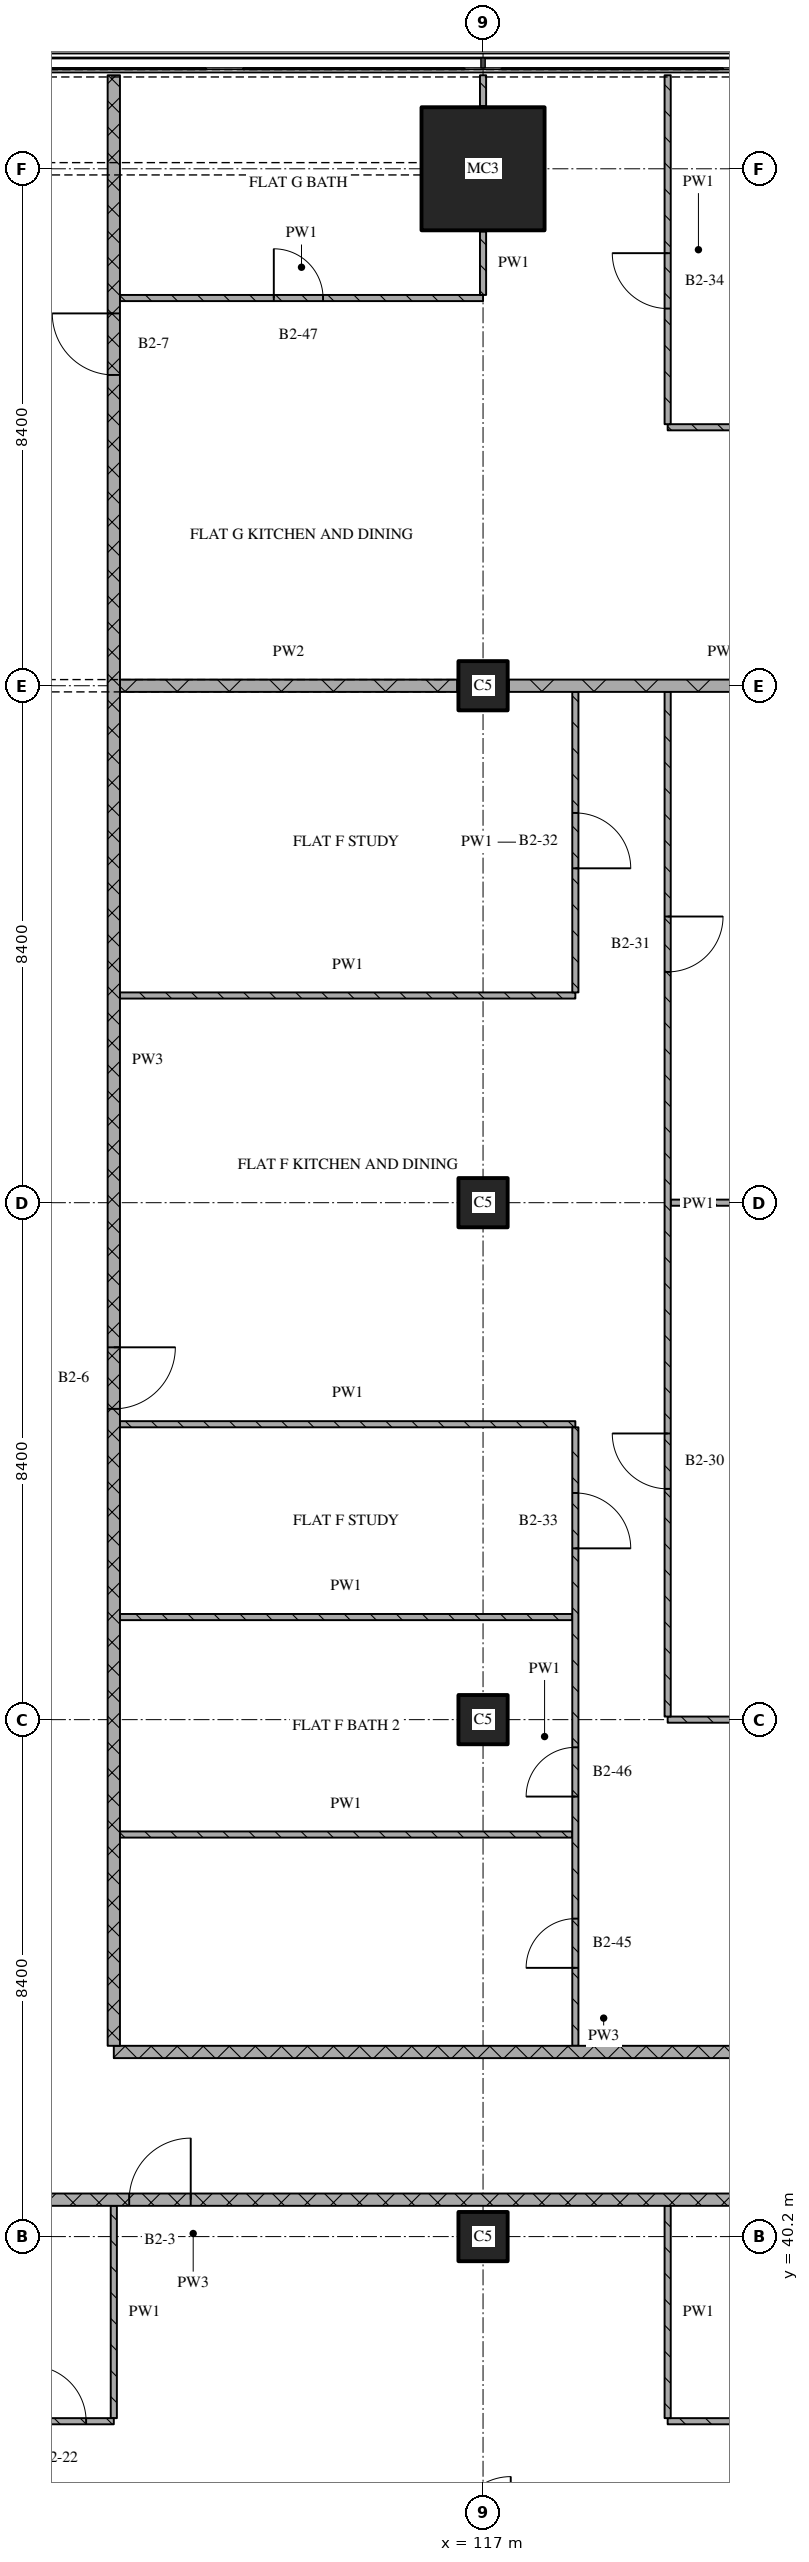
"""IFC4 building model, lengths in metres.
Left out: names, types, materials, properties, quantities, classifications, styles, units other than length and angle.
Written with IfcOpenShell. Run it as: python <this file> out.ifc"""

import sys

from ifc_helpers import new_model, si_unit, direction, frame, frame_2d, origin, origin_2d, place, context, subcontext, project, spatial, rectangle, extrude, element, fill, save


model = new_model("IFC4")
c1 = context("Model", 3, precision=1e-05, world=origin(), true_north=direction((0.0, 1.0)))
c2 = subcontext(c1, "Body", "Model", "MODEL_VIEW")
j1 = project(units=[si_unit("LENGTHUNIT", "METRE"), si_unit("PLANEANGLEUNIT", "RADIAN")], contexts=[c1])
p1 = place(None, origin())
s1 = spatial("IfcSite", under=j1, at=p1, CompositionType="ELEMENT")
p2 = place(p1, origin())
s2 = spatial("IfcBuilding", under=s1, at=p2, CompositionType="ELEMENT")
p3 = place(p2, frame((0.0, 0.0, 109.65)))
s3 = spatial("IfcBuildingStorey", under=s2, at=p3, CompositionType="ELEMENT", Elevation=109.65)
for number, where, z_axis, x_axis in (
    (1, (117.0, 40.2, 0.0), (0.0, 0.0, 1.0), (1.0, 0.0, 0.0)),
    (2, (117.0, 48.6, 0.0), (0.0, 0.0, 1.0), (1.0, 0.0, 0.0)),
    (3, (117.0, 57.0, 0.0), (0.0, 0.0, 1.0), (1.0, 0.0, 0.0)),
    (4, (117.0, 65.4, 0.0), (0.0, 0.0, 1.0), (1.0, 0.0, 0.0)),
):
    element("IfcColumn", number, at=place(p3, frame(where, z_axis=z_axis, x_axis=x_axis)), inside=s3, PredefinedType="COLUMN", context=c2, shape_type="SweptSolid", body=[
        extrude(rectangle(XDim=0.8, YDim=0.8, at=origin_2d()), origin(), (0.0, 0.0, 1.0), 3.6),
    ])
p4 = place(p3, frame((117.0, 73.8, 0.0), z_axis=(0.0, 0.0, 1.0), x_axis=(1.0, 0.0, 0.0)))
e5 = element("IfcColumn", 5, at=p4, inside=s3, PredefinedType="COLUMN", context=c2, shape_type="SweptSolid", body=[
    extrude(rectangle(XDim=2.0, YDim=2.0, at=origin_2d()), origin(), (0.0, 0.0, 1.0), 3.6),
])
p5 = place(p3, frame((120.0, 37.2, 0.0), z_axis=(0.0, 0.0, 1.0), x_axis=(1.0, 0.0, 0.0)))
e6 = element("IfcWall", 6, at=p5, inside=s3, PredefinedType="PARTITIONING", context=c2, shape_type="SweptSolid", body=[
    extrude(rectangle(XDim=6.92, YDim=0.1, at=frame_2d((3.46, 0.0))), origin(), (0.0, 0.0, 1.0), 3.32),
])
p6 = place(p5, frame((3.15, 0.0, 0.0)))
e7 = element("IfcOpeningElement", 7, at=p6, cuts=e6, PredefinedType="OPENING", context=c2, shape_type="SweptSolid", body=[
    extrude(rectangle(XDim=0.9, YDim=2.1, at=frame_2d((0.45, 1.05))), frame((0.0, 0.06, 0.0), z_axis=(0.0, -1.0, 0.0), x_axis=(1.0, 0.0, 0.0)), (0.0, 0.0, 1.0), 0.12),
])
p7 = place(p3, frame((124.38, 40.8, 0.0), z_axis=(0.0, 0.0, 1.0), x_axis=(-1.0, 0.0, 0.0)))
e8 = element("IfcWall", 8, at=p7, inside=s3, PredefinedType="PARTITIONING", context=c2, shape_type="SweptSolid", body=[
    extrude(rectangle(XDim=24.18, YDim=0.2, at=frame_2d((12.09, 0.0))), origin(), (0.0, 0.0, 1.0), 3.32),
])
p8 = place(p7, frame((12.13, 0.0, 0.0)))
e9 = element("IfcOpeningElement", 9, at=p8, cuts=e8, PredefinedType="OPENING", context=c2, shape_type="SweptSolid", body=[
    extrude(rectangle(XDim=1.0, YDim=2.1, at=frame_2d((0.5, 1.05))), frame((0.0, 0.11, 0.0), z_axis=(0.0, -1.0, 0.0), x_axis=(1.0, 0.0, 0.0)), (0.0, 0.0, 1.0), 0.22),
])
p9 = place(p3, frame((111.0, 43.2, 0.0), z_axis=(0.0, 0.0, 1.0), x_axis=(1.0, 0.0, 0.0)))
e10 = element("IfcWall", 10, at=p9, inside=s3, PredefinedType="PARTITIONING", context=c2, shape_type="SweptSolid", body=[
    extrude(rectangle(XDim=15.92, YDim=0.2, at=frame_2d((7.96, 0.0))), origin(), (0.0, 0.0, 1.0), 3.32),
])
p10 = place(p3, frame((111.1, 46.733, 0.0), z_axis=(0.0, 0.0, 1.0), x_axis=(1.0, 0.0, 0.0)))
e11 = element("IfcWall", 11, at=p10, inside=s3, PredefinedType="PARTITIONING", context=c2, shape_type="SweptSolid", body=[
    extrude(rectangle(XDim=7.35, YDim=0.1, at=frame_2d((3.675, 0.0))), origin(), (0.0, 0.0, 1.0), 3.32),
])
p11 = place(p3, frame((120.0, 48.6, 0.0), z_axis=(0.0, 0.0, 1.0), x_axis=(1.0, 0.0, 0.0)))
e12 = element("IfcWall", 12, at=p11, inside=s3, PredefinedType="PARTITIONING", context=c2, shape_type="SweptSolid", body=[
    extrude(rectangle(XDim=4.98, YDim=0.1, at=frame_2d((2.49, 0.0))), origin(), (0.0, 0.0, 1.0), 3.32),
])
p12 = place(p3, frame((111.1, 50.267, 0.0), z_axis=(0.0, 0.0, 1.0), x_axis=(1.0, 0.0, 0.0)))
e13 = element("IfcWall", 13, at=p12, inside=s3, PredefinedType="PARTITIONING", context=c2, shape_type="SweptSolid", body=[
    extrude(rectangle(XDim=7.35, YDim=0.1, at=frame_2d((3.675, 0.0))), origin(), (0.0, 0.0, 1.0), 3.32),
])
p13 = place(p3, frame((111.1, 53.4, 0.0), z_axis=(0.0, 0.0, 1.0), x_axis=(1.0, 0.0, 0.0)))
e14 = element("IfcWall", 14, at=p13, inside=s3, PredefinedType="PARTITIONING", context=c2, shape_type="SweptSolid", body=[
    extrude(rectangle(XDim=7.4, YDim=0.1, at=frame_2d((3.7, 0.0))), origin(), (0.0, 0.0, 1.0), 3.32),
])
p14 = place(p3, frame((120.05, 57.0, 0.0), z_axis=(0.0, 0.0, 1.0), x_axis=(1.0, 0.0, 0.0)))
e15 = element("IfcWall", 15, at=p14, inside=s3, PredefinedType="PARTITIONING", context=c2, shape_type="SweptSolid", body=[
    extrude(rectangle(XDim=4.93, YDim=0.1, at=frame_2d((2.465, 0.0))), origin(), (0.0, 0.0, 1.0), 3.32),
])
p15 = place(p3, frame((111.1, 60.367, 0.0), z_axis=(0.0, 0.0, 1.0), x_axis=(1.0, 0.0, 0.0)))
e16 = element("IfcWall", 16, at=p15, inside=s3, PredefinedType="PARTITIONING", context=c2, shape_type="SweptSolid", body=[
    extrude(rectangle(XDim=7.4, YDim=0.1, at=frame_2d((3.7, 0.0))), origin(), (0.0, 0.0, 1.0), 3.32),
])
p16 = place(p3, frame((111.1, 65.4, 0.0), z_axis=(0.0, 0.0, 1.0), x_axis=(1.0, 0.0, 0.0)))
e17 = element("IfcWall", 17, at=p16, inside=s3, PredefinedType="PARTITIONING", context=c2, shape_type="SweptSolid", body=[
    extrude(rectangle(XDim=5.48, YDim=0.2, at=frame_2d((2.74, 0.0))), origin(), (0.0, 0.0, 1.0), 2.82),
])
p17 = place(p3, frame((117.42, 65.4, 0.0), z_axis=(0.0, 0.0, 1.0), x_axis=(1.0, 0.0, 0.0)))
e18 = element("IfcWall", 18, at=p17, inside=s3, PredefinedType="PARTITIONING", context=c2, shape_type="SweptSolid", body=[
    extrude(rectangle(XDim=6.96, YDim=0.2, at=frame_2d((3.48, 0.0))), origin(), (0.0, 0.0, 1.0), 3.32),
])
p18 = place(p3, frame((120.0, 69.6, 0.0), z_axis=(0.0, 0.0, 1.0), x_axis=(1.0, 0.0, 0.0)))
e19 = element("IfcWall", 19, at=p18, inside=s3, PredefinedType="PARTITIONING", context=c2, shape_type="SweptSolid", body=[
    extrude(rectangle(XDim=6.92, YDim=0.1, at=frame_2d((3.46, 0.0))), origin(), (0.0, 0.0, 1.0), 3.32),
])
p19 = place(p3, frame((111.1, 71.7, 0.0), z_axis=(0.0, 0.0, 1.0), x_axis=(1.0, 0.0, 0.0)))
e20 = element("IfcWall", 20, at=p19, inside=s3, PredefinedType="PARTITIONING", context=c2, shape_type="SweptSolid", body=[
    extrude(rectangle(XDim=5.9, YDim=0.1, at=frame_2d((2.95, 0.0))), origin(), (0.0, 0.0, 1.0), 3.32),
])
p20 = place(p19, frame((2.5, 0.0, 0.0)))
e21 = element("IfcOpeningElement", 21, at=p20, cuts=e20, PredefinedType="OPENING", context=c2, shape_type="SweptSolid", body=[
    extrude(rectangle(XDim=0.8, YDim=2.1, at=frame_2d((0.4, 1.05))), frame((0.0, 0.06, 0.0), z_axis=(0.0, -1.0, 0.0), x_axis=(1.0, 0.0, 0.0)), (0.0, 0.0, 1.0), 0.12),
])
p21 = place(p3, frame((111.0, 75.32, 0.0), z_axis=(0.0, 0.0, 1.0), x_axis=(0.0, -1.0, 0.0)))
e22 = element("IfcWall", 22, at=p21, inside=s3, PredefinedType="PARTITIONING", context=c2, shape_type="SweptSolid", body=[
    extrude(rectangle(XDim=32.02, YDim=0.2, at=frame_2d((16.01, 0.0))), origin(), (0.0, 0.0, 1.0), 3.32),
])
p22 = place(p21, frame((3.87, 0.0, 0.0)))
e23 = element("IfcOpeningElement", 23, at=p22, cuts=e22, PredefinedType="OPENING", context=c2, shape_type="SweptSolid", body=[
    extrude(rectangle(XDim=1.0, YDim=2.1, at=frame_2d((0.5, 1.05))), frame((0.0, 0.11, 0.0), z_axis=(0.0, -1.0, 0.0), x_axis=(1.0, 0.0, 0.0)), (0.0, 0.0, 1.0), 0.22),
])
p23 = place(p21, frame((20.67, 0.0, 0.0)))
e24 = element("IfcOpeningElement", 24, at=p23, cuts=e22, PredefinedType="OPENING", context=c2, shape_type="SweptSolid", body=[
    extrude(rectangle(XDim=1.0, YDim=2.1, at=frame_2d((0.5, 1.05))), frame((0.0, 0.11, 0.0), z_axis=(0.0, -1.0, 0.0), x_axis=(1.0, 0.0, 0.0)), (0.0, 0.0, 1.0), 0.22),
])
p24 = place(p3, frame((111.0, 40.7, 0.0), z_axis=(0.0, 0.0, 1.0), x_axis=(0.0, -1.0, 0.0)))
e25 = element("IfcWall", 25, at=p24, inside=s3, PredefinedType="PARTITIONING", context=c2, shape_type="SweptSolid", body=[
    extrude(rectangle(XDim=3.45, YDim=0.1, at=frame_2d((1.725, 0.0))), origin(), (0.0, 0.0, 1.0), 3.32),
])
p25 = place(p3, frame((117.0, 72.78, 0.0), z_axis=(0.0, 0.0, 1.0), x_axis=(0.0, -1.0, 0.0)))
e26 = element("IfcWall", 26, at=p25, inside=s3, PredefinedType="PARTITIONING", context=c2, shape_type="SweptSolid", body=[
    extrude(rectangle(XDim=1.03, YDim=0.1, at=frame_2d((0.515, 0.0))), origin(), (0.0, 0.0, 1.0), 3.32),
])
p26 = place(p3, frame((117.0, 75.32, 0.0), z_axis=(0.0, 0.0, 1.0), x_axis=(0.0, -1.0, 0.0)))
e27 = element("IfcWall", 27, at=p26, inside=s3, PredefinedType="PARTITIONING", context=c2, shape_type="SweptSolid", body=[
    extrude(rectangle(XDim=0.5, YDim=0.1, at=frame_2d((0.25, 0.0))), origin(), (0.0, 0.0, 1.0), 3.32),
])
p27 = place(p3, frame((118.5, 43.3, 0.0), z_axis=(0.0, 0.0, 1.0), x_axis=(0.0, 1.0, 0.0)))
e28 = element("IfcWall", 28, at=p27, inside=s3, PredefinedType="PARTITIONING", context=c2, shape_type="SweptSolid", body=[
    extrude(rectangle(XDim=10.05, YDim=0.1, at=frame_2d((5.025, 0.0))), origin(), (0.0, 0.0, 1.0), 3.32),
])
p28 = place(p27, frame((1.267, 0.0, 0.0)))
e29 = element("IfcOpeningElement", 29, at=p28, cuts=e28, PredefinedType="OPENING", context=c2, shape_type="SweptSolid", body=[
    extrude(rectangle(XDim=0.8, YDim=2.1, at=frame_2d((0.4, 1.05))), frame((0.0, 0.06, 0.0), z_axis=(0.0, -1.0, 0.0), x_axis=(1.0, 0.0, 0.0)), (0.0, 0.0, 1.0), 0.12),
])
p29 = place(p27, frame((4.05, 0.0, 0.0)))
e30 = element("IfcOpeningElement", 30, at=p29, cuts=e28, PredefinedType="OPENING", context=c2, shape_type="SweptSolid", body=[
    extrude(rectangle(XDim=0.8, YDim=2.1, at=frame_2d((0.4, 1.05))), frame((0.0, 0.06, 0.0), z_axis=(0.0, -1.0, 0.0), x_axis=(1.0, 0.0, 0.0)), (0.0, 0.0, 1.0), 0.12),
])
p30 = place(p27, frame((8.083, 0.0, 0.0)))
e31 = element("IfcOpeningElement", 31, at=p30, cuts=e28, PredefinedType="OPENING", context=c2, shape_type="SweptSolid", body=[
    extrude(rectangle(XDim=0.9, YDim=2.1, at=frame_2d((0.45, 1.05))), frame((0.0, 0.06, 0.0), z_axis=(0.0, -1.0, 0.0), x_axis=(1.0, 0.0, 0.0)), (0.0, 0.0, 1.0), 0.12),
])
p31 = place(p3, frame((118.5, 60.417, 0.0), z_axis=(0.0, 0.0, 1.0), x_axis=(0.0, 1.0, 0.0)))
e32 = element("IfcWall", 32, at=p31, inside=s3, PredefinedType="PARTITIONING", context=c2, shape_type="SweptSolid", body=[
    extrude(rectangle(XDim=4.883, YDim=0.1, at=frame_2d((2.442, 0.0))), origin(), (0.0, 0.0, 1.0), 3.32),
])
p32 = place(p31, frame((2.017, 0.0, 0.0)))
e33 = element("IfcOpeningElement", 33, at=p32, cuts=e32, PredefinedType="OPENING", context=c2, shape_type="SweptSolid", body=[
    extrude(rectangle(XDim=0.9, YDim=2.1, at=frame_2d((0.45, 1.05))), frame((0.0, 0.06, 0.0), z_axis=(0.0, -1.0, 0.0), x_axis=(1.0, 0.0, 0.0)), (0.0, 0.0, 1.0), 0.12),
])
p33 = place(p3, frame((120.0, 40.7, 0.0), z_axis=(0.0, 0.0, 1.0), x_axis=(0.0, -1.0, 0.0)))
e34 = element("IfcWall", 34, at=p33, inside=s3, PredefinedType="PARTITIONING", context=c2, shape_type="SweptSolid", body=[
    extrude(rectangle(XDim=3.45, YDim=0.1, at=frame_2d((1.725, 0.0))), origin(), (0.0, 0.0, 1.0), 3.32),
])
p34 = place(p3, frame((120.0, 65.3, 0.0), z_axis=(0.0, 0.0, 1.0), x_axis=(0.0, -1.0, 0.0)))
e35 = element("IfcWall", 35, at=p34, inside=s3, PredefinedType="PARTITIONING", context=c2, shape_type="SweptSolid", body=[
    extrude(rectangle(XDim=16.65, YDim=0.1, at=frame_2d((8.325, 0.0))), origin(), (0.0, 0.0, 1.0), 3.32),
])
p35 = place(p34, frame((3.65, 0.0, 0.0)))
e36 = element("IfcOpeningElement", 36, at=p35, cuts=e35, PredefinedType="OPENING", context=c2, shape_type="SweptSolid", body=[
    extrude(rectangle(XDim=0.9, YDim=2.1, at=frame_2d((0.45, 1.05))), frame((0.0, 0.06, 0.0), z_axis=(0.0, -1.0, 0.0), x_axis=(1.0, 0.0, 0.0)), (0.0, 0.0, 1.0), 0.12),
])
p36 = place(p34, frame((12.05, 0.0, 0.0)))
e37 = element("IfcOpeningElement", 37, at=p36, cuts=e35, PredefinedType="OPENING", context=c2, shape_type="SweptSolid", body=[
    extrude(rectangle(XDim=0.9, YDim=2.1, at=frame_2d((0.45, 1.05))), frame((0.0, 0.06, 0.0), z_axis=(0.0, -1.0, 0.0), x_axis=(1.0, 0.0, 0.0)), (0.0, 0.0, 1.0), 0.12),
])
p37 = place(p3, frame((120.0, 75.32, 0.0), z_axis=(0.0, 0.0, 1.0), x_axis=(0.0, -1.0, 0.0)))
e38 = element("IfcWall", 38, at=p37, inside=s3, PredefinedType="PARTITIONING", context=c2, shape_type="SweptSolid", body=[
    extrude(rectangle(XDim=5.67, YDim=0.1, at=frame_2d((2.835, 0.0))), origin(), (0.0, 0.0, 1.0), 3.32),
])
p38 = place(p37, frame((2.891, 0.0, 0.0)))
e39 = element("IfcOpeningElement", 39, at=p38, cuts=e38, PredefinedType="OPENING", context=c2, shape_type="SweptSolid", body=[
    extrude(rectangle(XDim=0.9, YDim=2.1, at=frame_2d((0.45, 1.05))), frame((0.0, 0.06, 0.0), z_axis=(0.0, -1.0, 0.0), x_axis=(1.0, 0.0, 0.0)), (0.0, 0.0, 1.0), 0.12),
])
p39 = place(p3, frame((100.3, 37.2, 0.0), z_axis=(0.0, 0.0, 1.0), x_axis=(1.0, 0.0, 0.0)))
e40 = element("IfcWall", 40, at=p39, inside=s3, PredefinedType="PARTITIONING", context=c2, shape_type="SweptSolid", body=[
    extrude(rectangle(XDim=10.7, YDim=0.1, at=frame_2d((5.35, 0.0))), origin(), (0.0, 0.0, 1.0), 3.32),
])
p40 = place(p39, frame((1.75, 0.0, 0.0)))
e41 = element("IfcOpeningElement", 41, at=p40, cuts=e40, PredefinedType="OPENING", context=c2, shape_type="SweptSolid", body=[
    extrude(rectangle(XDim=0.8, YDim=2.1, at=frame_2d((0.4, 1.05))), frame((0.0, 0.06, 0.0), z_axis=(0.0, -1.0, 0.0), x_axis=(1.0, 0.0, 0.0)), (0.0, 0.0, 1.0), 0.12),
])
p41 = place(p39, frame((6.25, 0.0, 0.0)))
e42 = element("IfcOpeningElement", 42, at=p41, cuts=e40, PredefinedType="OPENING", context=c2, shape_type="SweptSolid", body=[
    extrude(rectangle(XDim=0.8, YDim=2.1, at=frame_2d((0.4, 1.05))), frame((0.0, 0.06, 0.0), z_axis=(0.0, -1.0, 0.0), x_axis=(1.0, 0.0, 0.0)), (0.0, 0.0, 1.0), 0.12),
])
p42 = place(p39, frame((9.35, 0.0, 0.0)))
e43 = element("IfcOpeningElement", 43, at=p42, cuts=e40, PredefinedType="OPENING", context=c2, shape_type="SweptSolid", body=[
    extrude(rectangle(XDim=0.9, YDim=2.1, at=frame_2d((0.45, 1.05))), frame((0.0, 0.06, 0.0), z_axis=(0.0, -1.0, 0.0), x_axis=(1.0, 0.0, 0.0)), (0.0, 0.0, 1.0), 0.12),
])
p43 = place(p8, origin())
e44 = element("IfcDoor", 44, at=p43, inside=s3, OperationType="SINGLE_SWING_RIGHT", PredefinedType="DOOR", context=c2, shape_type="SweptSolid", body=[
    extrude(rectangle(XDim=1.0, YDim=2.1, at=frame_2d((0.5, 1.05))), frame((0.0, 0.025, 0.0), z_axis=(0.0, -1.0, 0.0), x_axis=(1.0, 0.0, 0.0)), (0.0, 0.0, 1.0), 0.05),
])
fill(e9, e44)
p44 = place(p20, origin())
e45 = element("IfcDoor", 45, at=p44, inside=s3, OperationType="SINGLE_SWING_LEFT", PredefinedType="DOOR", context=c2, shape_type="SweptSolid", body=[
    extrude(rectangle(XDim=0.8, YDim=2.1, at=frame_2d((0.4, 1.05))), frame((0.0, 0.025, 0.0), z_axis=(0.0, -1.0, 0.0), x_axis=(1.0, 0.0, 0.0)), (0.0, 0.0, 1.0), 0.05),
])
fill(e21, e45)
p45 = place(p22, origin())
e46 = element("IfcDoor", 46, at=p45, inside=s3, OperationType="SINGLE_SWING_RIGHT", PredefinedType="DOOR", context=c2, shape_type="SweptSolid", body=[
    extrude(rectangle(XDim=1.0, YDim=2.1, at=frame_2d((0.5, 1.05))), frame((0.0, 0.025, 0.0), z_axis=(0.0, -1.0, 0.0), x_axis=(1.0, 0.0, 0.0)), (0.0, 0.0, 1.0), 0.05),
])
fill(e23, e46)
p46 = place(p23, origin())
e47 = element("IfcDoor", 47, at=p46, inside=s3, OperationType="SINGLE_SWING_LEFT", PredefinedType="DOOR", context=c2, shape_type="SweptSolid", body=[
    extrude(rectangle(XDim=1.0, YDim=2.1, at=frame_2d((0.5, 1.05))), frame((0.0, 0.025, 0.0), z_axis=(0.0, -1.0, 0.0), x_axis=(1.0, 0.0, 0.0)), (0.0, 0.0, 1.0), 0.05),
])
fill(e24, e47)
p47 = place(p28, origin())
e48 = element("IfcDoor", 48, at=p47, inside=s3, OperationType="SINGLE_SWING_LEFT", PredefinedType="DOOR", context=c2, shape_type="SweptSolid", body=[
    extrude(rectangle(XDim=0.8, YDim=2.1, at=frame_2d((0.4, 1.05))), frame((0.0, 0.025, 0.0), z_axis=(0.0, -1.0, 0.0), x_axis=(1.0, 0.0, 0.0)), (0.0, 0.0, 1.0), 0.05),
])
fill(e29, e48)
p48 = place(p29, origin())
e49 = element("IfcDoor", 49, at=p48, inside=s3, OperationType="SINGLE_SWING_LEFT", PredefinedType="DOOR", context=c2, shape_type="SweptSolid", body=[
    extrude(rectangle(XDim=0.8, YDim=2.1, at=frame_2d((0.4, 1.05))), frame((0.0, 0.025, 0.0), z_axis=(0.0, -1.0, 0.0), x_axis=(1.0, 0.0, 0.0)), (0.0, 0.0, 1.0), 0.05),
])
fill(e30, e49)
p49 = place(p30, origin())
e50 = element("IfcDoor", 50, at=p49, inside=s3, OperationType="SINGLE_SWING_RIGHT", PredefinedType="DOOR", context=c2, shape_type="SweptSolid", body=[
    extrude(rectangle(XDim=0.9, YDim=2.1, at=frame_2d((0.45, 1.05))), frame((0.0, 0.025, 0.0), z_axis=(0.0, -1.0, 0.0), x_axis=(1.0, 0.0, 0.0)), (0.0, 0.0, 1.0), 0.05),
])
fill(e31, e50)
p50 = place(p32, origin())
e51 = element("IfcDoor", 51, at=p50, inside=s3, OperationType="SINGLE_SWING_RIGHT", PredefinedType="DOOR", context=c2, shape_type="SweptSolid", body=[
    extrude(rectangle(XDim=0.9, YDim=2.1, at=frame_2d((0.45, 1.05))), frame((0.0, 0.025, 0.0), z_axis=(0.0, -1.0, 0.0), x_axis=(1.0, 0.0, 0.0)), (0.0, 0.0, 1.0), 0.05),
])
fill(e33, e51)
p51 = place(p35, origin())
e52 = element("IfcDoor", 52, at=p51, inside=s3, OperationType="SINGLE_SWING_LEFT", PredefinedType="DOOR", context=c2, shape_type="SweptSolid", body=[
    extrude(rectangle(XDim=0.9, YDim=2.1, at=frame_2d((0.45, 1.05))), frame((0.0, 0.025, 0.0), z_axis=(0.0, -1.0, 0.0), x_axis=(1.0, 0.0, 0.0)), (0.0, 0.0, 1.0), 0.05),
])
fill(e36, e52)
p52 = place(p36, origin())
e53 = element("IfcDoor", 53, at=p52, inside=s3, OperationType="SINGLE_SWING_RIGHT", PredefinedType="DOOR", context=c2, shape_type="SweptSolid", body=[
    extrude(rectangle(XDim=0.9, YDim=2.1, at=frame_2d((0.45, 1.05))), frame((0.0, 0.025, 0.0), z_axis=(0.0, -1.0, 0.0), x_axis=(1.0, 0.0, 0.0)), (0.0, 0.0, 1.0), 0.05),
])
fill(e37, e53)
p53 = place(p38, origin())
e54 = element("IfcDoor", 54, at=p53, inside=s3, OperationType="SINGLE_SWING_RIGHT", PredefinedType="DOOR", context=c2, shape_type="SweptSolid", body=[
    extrude(rectangle(XDim=0.9, YDim=2.1, at=frame_2d((0.45, 1.05))), frame((0.0, 0.025, 0.0), z_axis=(0.0, -1.0, 0.0), x_axis=(1.0, 0.0, 0.0)), (0.0, 0.0, 1.0), 0.05),
])
fill(e39, e54)
p54 = place(p42, origin())
e55 = element("IfcDoor", 55, at=p54, inside=s3, OperationType="SINGLE_SWING_LEFT", PredefinedType="DOOR", context=c2, shape_type="SweptSolid", body=[
    extrude(rectangle(XDim=0.9, YDim=2.1, at=frame_2d((0.45, 1.05))), frame((0.0, 0.025, 0.0), z_axis=(0.0, -1.0, 0.0), x_axis=(1.0, 0.0, 0.0)), (0.0, 0.0, 1.0), 0.05),
])
fill(e43, e55)
save(model, sys.argv[1])
